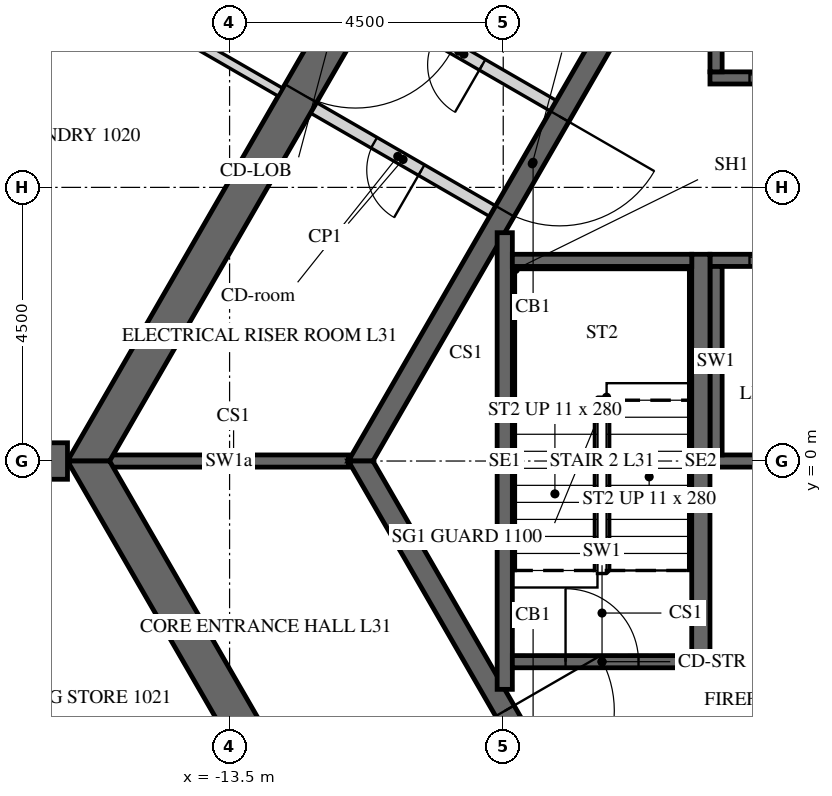
"""IFC4 building model, lengths in metres.
Left out: names, types, materials, properties, quantities, classifications, styles, units other than length and angle.
Written with IfcOpenShell. Run it as: python <this file> out.ifc"""

import sys

from ifc_helpers import new_model, si_unit, direction, frame, frame_2d, origin, place, context, subcontext, project, spatial, polyline, rectangle, outline, extrude, element, fill, save


model = new_model("IFC4")
c1 = context("Model", 3, precision=1e-05, world=origin(), true_north=direction((0.0, 1.0)))
c2 = subcontext(c1, "Body", "Model", "MODEL_VIEW")
j1 = project(units=[si_unit("LENGTHUNIT", "METRE"), si_unit("PLANEANGLEUNIT", "RADIAN")], contexts=[c1])
p1 = place(None, origin())
s1 = spatial("IfcSite", under=j1, at=p1, CompositionType="ELEMENT")
p2 = place(p1, origin())
s2 = spatial("IfcBuilding", under=s1, at=p2, CompositionType="ELEMENT")
p3 = place(p2, frame((0.0, 0.0, 135.0)))
s3 = spatial("IfcBuildingStorey", under=s2, at=p3, CompositionType="ELEMENT", Elevation=135.0)
p4 = place(p3, frame((-7.91, 13.7, -0.15), z_axis=(0.0, 0.0, 1.0), x_axis=(-0.499999880136, -0.866025472988, 0.0)))
e1 = element("IfcWall", 1, at=p4, inside=s3, PredefinedType="SHEAR", context=c2, shape_type="SweptSolid", body=[
    extrude(outline(polyline([(-0.173, -0.3), (15.993, -0.3), (15.646, 0.3), (0.173, 0.3), (-0.173, -0.3)])), origin(), (0.0, 0.0, 1.0), 3.9),
])
p5 = place(p4, frame((7.039, 0.0, 0.15)))
e2 = element("IfcOpeningElement", 2, at=p5, cuts=e1, PredefinedType="OPENING", context=c2, shape_type="SweptSolid", body=[
    extrude(rectangle(XDim=1.8, YDim=2.4, at=frame_2d((0.9, 1.2))), frame((0.0, 0.31, 0.0), z_axis=(0.0, -1.0, 0.0), x_axis=(1.0, 0.0, 0.0)), (0.0, 0.0, 1.0), 0.62),
])
p6 = place(p3, frame((-15.819, 0.0, -0.15), z_axis=(0.0, 0.0, 1.0), x_axis=(0.499999880136, -0.866025472988, 0.0)))
e3 = element("IfcWall", 3, at=p6, inside=s3, PredefinedType="SHEAR", context=c2, shape_type="SweptSolid", body=[
    extrude(outline(polyline([(-0.173, -0.3), (15.993, -0.3), (15.646, 0.3), (0.173, 0.3), (-0.173, -0.3)])), origin(), (0.0, 0.0, 1.0), 3.9),
])
p7 = place(p6, frame((6.981, 0.0, 0.15)))
e4 = element("IfcOpeningElement", 4, at=p7, cuts=e3, PredefinedType="OPENING", context=c2, shape_type="SweptSolid", body=[
    extrude(rectangle(XDim=1.8, YDim=2.4, at=frame_2d((0.9, 1.2))), frame((0.0, 0.31, 0.0), z_axis=(0.0, -1.0, 0.0), x_axis=(1.0, 0.0, 0.0)), (0.0, 0.0, 1.0), 0.62),
])
p8 = place(p3, frame((-16.166, 0.0, -0.15), z_axis=(0.0, 0.0, 1.0), x_axis=(-1.0, 0.0, 0.0)))
e5 = element("IfcWall", 5, at=p8, inside=s3, PredefinedType="SHEAR", context=c2, shape_type="SweptSolid", body=[
    extrude(rectangle(XDim=16.509, YDim=0.6, at=frame_2d((8.254, 0.0))), origin(), (0.0, 0.0, 1.0), 3.9),
])
p9 = place(p8, frame((7.354, 0.0, 0.15)))
e6 = element("IfcOpeningElement", 6, at=p9, cuts=e5, PredefinedType="OPENING", context=c2, shape_type="SweptSolid", body=[
    extrude(rectangle(XDim=1.8, YDim=2.4, at=frame_2d((0.9, 1.2))), frame((0.0, 0.31, 0.0), z_axis=(0.0, -1.0, 0.0), x_axis=(1.0, 0.0, 0.0)), (0.0, 0.0, 1.0), 0.62),
])
p10 = place(p3, frame((-5.673, 9.825, -0.15), z_axis=(0.0, 0.0, 1.0), x_axis=(-0.499995046907, -0.866028263435, 0.0)))
e7 = element("IfcWall", 7, at=p10, inside=s3, PredefinedType="SHEAR", context=c2, shape_type="SweptSolid", body=[
    extrude(outline(polyline([(-0.101, -0.175), (11.446, -0.175), (11.244, 0.175), (0.101, 0.175), (-0.101, -0.175)])), origin(), (0.0, 0.0, 1.0), 3.9),
])
p11 = place(p10, frame((4.801, 0.0, 0.15)))
e8 = element("IfcOpeningElement", 8, at=p11, cuts=e7, PredefinedType="OPENING", context=c2, shape_type="SweptSolid", body=[
    extrude(rectangle(XDim=1.8, YDim=2.4, at=frame_2d((0.9, 1.2))), frame((0.0, 0.185, 0.0), z_axis=(0.0, -1.0, 0.0), x_axis=(1.0, 0.0, 0.0)), (0.0, 0.0, 1.0), 0.37),
])
p12 = place(p3, frame((-11.345, 0.0, -0.15), z_axis=(0.0, 0.0, 1.0), x_axis=(0.499995046907, -0.866028263435, 0.0)))
e9 = element("IfcWall", 9, at=p12, inside=s3, PredefinedType="SHEAR", context=c2, shape_type="SweptSolid", body=[
    extrude(outline(polyline([(-0.101, -0.175), (11.446, -0.175), (11.244, 0.175), (0.101, 0.175), (-0.101, -0.175)])), origin(), (0.0, 0.0, 1.0), 3.9),
])
p13 = place(p12, frame((4.744, 0.0, 0.15)))
e10 = element("IfcOpeningElement", 10, at=p13, cuts=e9, PredefinedType="OPENING", context=c2, shape_type="SweptSolid", body=[
    extrude(rectangle(XDim=1.8, YDim=2.4, at=frame_2d((0.9, 1.2))), frame((0.0, 0.185, 0.0), z_axis=(0.0, -1.0, 0.0), x_axis=(1.0, 0.0, 0.0)), (0.0, 0.0, 1.0), 0.37),
])
p14 = place(p3, frame((-5.6, 6.3, -0.25), z_axis=(0.0, 0.0, 1.0), x_axis=(1.0, 0.0, 0.0)))
e11 = element("IfcWall", 11, at=p14, inside=s3, PredefinedType="SHEAR", context=c2, shape_type="SweptSolid", body=[
    extrude(rectangle(XDim=11.2, YDim=0.2, at=frame_2d((5.6, 0.0))), origin(), (0.0, 0.0, 1.0), 3.9),
])
p15 = place(p14, frame((0.65, 0.0, 0.25)))
e12 = element("IfcOpeningElement", 12, at=p15, cuts=e11, PredefinedType="OPENING", context=c2, shape_type="SweptSolid", body=[
    extrude(rectangle(XDim=1.1, YDim=2.1, at=frame_2d((0.55, 1.05))), frame((0.0, 0.11, 0.0), z_axis=(0.0, -1.0, 0.0), x_axis=(1.0, 0.0, 0.0)), (0.0, 0.0, 1.0), 0.22),
])
p16 = place(p14, frame((2.85, 0.0, 0.25)))
e13 = element("IfcOpeningElement", 13, at=p16, cuts=e11, PredefinedType="OPENING", context=c2, shape_type="SweptSolid", body=[
    extrude(rectangle(XDim=1.1, YDim=2.1, at=frame_2d((0.55, 1.05))), frame((0.0, 0.11, 0.0), z_axis=(0.0, -1.0, 0.0), x_axis=(1.0, 0.0, 0.0)), (0.0, 0.0, 1.0), 0.22),
])
p17 = place(p14, frame((5.05, 0.0, 0.25)))
e14 = element("IfcOpeningElement", 14, at=p17, cuts=e11, PredefinedType="OPENING", context=c2, shape_type="SweptSolid", body=[
    extrude(rectangle(XDim=1.1, YDim=2.1, at=frame_2d((0.55, 1.05))), frame((0.0, 0.11, 0.0), z_axis=(0.0, -1.0, 0.0), x_axis=(1.0, 0.0, 0.0)), (0.0, 0.0, 1.0), 0.22),
])
p18 = place(p14, frame((7.25, 0.0, 0.25)))
e15 = element("IfcOpeningElement", 15, at=p18, cuts=e11, PredefinedType="OPENING", context=c2, shape_type="SweptSolid", body=[
    extrude(rectangle(XDim=1.1, YDim=2.1, at=frame_2d((0.55, 1.05))), frame((0.0, 0.11, 0.0), z_axis=(0.0, -1.0, 0.0), x_axis=(1.0, 0.0, 0.0)), (0.0, 0.0, 1.0), 0.22),
])
p19 = place(p14, frame((9.45, 0.0, 0.25)))
e16 = element("IfcOpeningElement", 16, at=p19, cuts=e11, PredefinedType="OPENING", context=c2, shape_type="SweptSolid", body=[
    extrude(rectangle(XDim=1.1, YDim=2.1, at=frame_2d((0.55, 1.05))), frame((0.0, 0.11, 0.0), z_axis=(0.0, -1.0, 0.0), x_axis=(1.0, 0.0, 0.0)), (0.0, 0.0, 1.0), 0.22),
])
p20 = place(p3, frame((-5.5, 6.4, -0.25), z_axis=(0.0, 0.0, 1.0), x_axis=(0.0, 1.0, 0.0)))
e17 = element("IfcWall", 17, at=p20, inside=s3, PredefinedType="SHEAR", context=c2, shape_type="SweptSolid", body=[
    extrude(rectangle(XDim=2.9, YDim=0.2, at=frame_2d((1.45, 0.0))), origin(), (0.0, 0.0, 1.0), 3.9),
])
p21 = place(p3, frame((-5.6, 3.3, -0.25), z_axis=(0.0, 0.0, 1.0), x_axis=(1.0, 0.0, 0.0)))
e18 = element("IfcWall", 18, at=p21, inside=s3, PredefinedType="SHEAR", context=c2, shape_type="SweptSolid", body=[
    extrude(rectangle(XDim=11.2, YDim=0.2, at=frame_2d((5.6, 0.0))), origin(), (0.0, 0.0, 1.0), 3.9),
])
p22 = place(p21, frame((0.65, 0.0, 0.25)))
e19 = element("IfcOpeningElement", 19, at=p22, cuts=e18, PredefinedType="OPENING", context=c2, shape_type="SweptSolid", body=[
    extrude(rectangle(XDim=1.1, YDim=2.1, at=frame_2d((0.55, 1.05))), frame((0.0, 0.11, 0.0), z_axis=(0.0, -1.0, 0.0), x_axis=(1.0, 0.0, 0.0)), (0.0, 0.0, 1.0), 0.22),
])
p23 = place(p21, frame((2.85, 0.0, 0.25)))
e20 = element("IfcOpeningElement", 20, at=p23, cuts=e18, PredefinedType="OPENING", context=c2, shape_type="SweptSolid", body=[
    extrude(rectangle(XDim=1.1, YDim=2.1, at=frame_2d((0.55, 1.05))), frame((0.0, 0.11, 0.0), z_axis=(0.0, -1.0, 0.0), x_axis=(1.0, 0.0, 0.0)), (0.0, 0.0, 1.0), 0.22),
])
p24 = place(p21, frame((5.05, 0.0, 0.25)))
e21 = element("IfcOpeningElement", 21, at=p24, cuts=e18, PredefinedType="OPENING", context=c2, shape_type="SweptSolid", body=[
    extrude(rectangle(XDim=1.1, YDim=2.1, at=frame_2d((0.55, 1.05))), frame((0.0, 0.11, 0.0), z_axis=(0.0, -1.0, 0.0), x_axis=(1.0, 0.0, 0.0)), (0.0, 0.0, 1.0), 0.22),
])
p25 = place(p21, frame((7.25, 0.0, 0.25)))
e22 = element("IfcOpeningElement", 22, at=p25, cuts=e18, PredefinedType="OPENING", context=c2, shape_type="SweptSolid", body=[
    extrude(rectangle(XDim=1.1, YDim=2.1, at=frame_2d((0.55, 1.05))), frame((0.0, 0.11, 0.0), z_axis=(0.0, -1.0, 0.0), x_axis=(1.0, 0.0, 0.0)), (0.0, 0.0, 1.0), 0.22),
])
p26 = place(p21, frame((9.45, 0.0, 0.25)))
e23 = element("IfcOpeningElement", 23, at=p26, cuts=e18, PredefinedType="OPENING", context=c2, shape_type="SweptSolid", body=[
    extrude(rectangle(XDim=1.1, YDim=2.1, at=frame_2d((0.55, 1.05))), frame((0.0, 0.11, 0.0), z_axis=(0.0, -1.0, 0.0), x_axis=(1.0, 0.0, 0.0)), (0.0, 0.0, 1.0), 0.22),
])
p27 = place(p3, frame((-5.6, 0.0, -0.25), z_axis=(0.0, 0.0, 1.0), x_axis=(1.0, 0.0, 0.0)))
e24 = element("IfcWall", 24, at=p27, inside=s3, PredefinedType="SHEAR", context=c2, shape_type="SweptSolid", body=[
    extrude(rectangle(XDim=11.2, YDim=0.2, at=frame_2d((5.6, 0.0))), origin(), (0.0, 0.0, 1.0), 3.9),
])
p28 = place(p3, frame((-5.5, 0.1, -0.25), z_axis=(0.0, 0.0, 1.0), x_axis=(0.0, 1.0, 0.0)))
e25 = element("IfcWall", 25, at=p28, inside=s3, PredefinedType="SHEAR", context=c2, shape_type="SweptSolid", body=[
    extrude(rectangle(XDim=3.1, YDim=0.2, at=frame_2d((1.55, 0.0))), origin(), (0.0, 0.0, 1.0), 3.9),
])
p29 = place(p3, frame((-11.547, 0.0, -0.15), z_axis=(0.0, 0.0, 1.0), x_axis=(-1.0, 0.0, 0.0)))
e26 = element("IfcWall", 26, at=p29, inside=s3, PredefinedType="SHEAR", context=c2, shape_type="SweptSolid", body=[
    extrude(rectangle(XDim=3.926, YDim=0.2, at=frame_2d((1.963, 0.0))), origin(), (0.0, 0.0, 1.0), 3.9),
])
p30 = place(p3, frame((-9.175, 4.109, 0.0), z_axis=(0.0, 0.0, 1.0), x_axis=(-0.865989465428, 0.500062241894, 0.0)))
e27 = element("IfcWall", 27, at=p30, inside=s3, PredefinedType="PARTITIONING", context=c2, shape_type="SweptSolid", body=[
    extrude(rectangle(XDim=3.4, YDim=0.2, at=frame_2d((1.7, 0.0))), origin(), (0.0, 0.0, 1.0), 3.65),
])
p31 = place(p30, frame((1.351, 0.0, 0.0)))
e28 = element("IfcOpeningElement", 28, at=p31, cuts=e27, PredefinedType="OPENING", context=c2, shape_type="SweptSolid", body=[
    extrude(rectangle(XDim=0.9, YDim=2.1, at=frame_2d((0.45, 1.05))), frame((0.0, 0.11, 0.0), z_axis=(0.0, -1.0, 0.0), x_axis=(1.0, 0.0, 0.0)), (0.0, 0.0, 1.0), 0.22),
])
p32 = place(p3, frame((-8.175, 5.841, 0.0), z_axis=(0.0, 0.0, 1.0), x_axis=(-0.866020560687, 0.500008388397, 0.0)))
e29 = element("IfcWall", 29, at=p32, inside=s3, PredefinedType="PARTITIONING", context=c2, shape_type="SweptSolid", body=[
    extrude(rectangle(XDim=3.4, YDim=0.2, at=frame_2d((1.7, 0.0))), origin(), (0.0, 0.0, 1.0), 3.65),
])
p33 = place(p32, frame((1.35, 0.0, 0.0)))
e30 = element("IfcOpeningElement", 30, at=p33, cuts=e29, PredefinedType="OPENING", context=c2, shape_type="SweptSolid", body=[
    extrude(rectangle(XDim=0.9, YDim=2.1, at=frame_2d((0.45, 1.05))), frame((0.0, 0.11, 0.0), z_axis=(0.0, -1.0, 0.0), x_axis=(1.0, 0.0, 0.0)), (0.0, 0.0, 1.0), 0.22),
])
p34 = place(p3, frame((-5.75, -3.4, -0.25), z_axis=(0.0, 0.0, 1.0), x_axis=(0.0, 1.0, 0.0)))
e31 = element("IfcWall", 31, at=p34, inside=s3, PredefinedType="SHEAR", context=c2, shape_type="SweptSolid", body=[
    extrude(rectangle(XDim=6.8, YDim=0.3, at=frame_2d((3.4, 0.0))), origin(), (0.0, 0.0, 1.0), 3.9),
])
p35 = place(p3, frame((-8.975, -3.755, -0.25), z_axis=(0.0, 0.0, 1.0), x_axis=(0.0, 1.0, 0.0)))
e32 = element("IfcWall", 32, at=p35, inside=s3, PredefinedType="SHEAR", context=c2, shape_type="SweptSolid", body=[
    extrude(rectangle(XDim=7.51, YDim=0.25, at=frame_2d((3.755, 0.0))), origin(), (0.0, 0.0, 1.0), 3.9),
])
p36 = place(p3, frame((-8.85, 3.3, -0.25), z_axis=(0.0, 0.0, 1.0), x_axis=(1.0, 0.0, 0.0)))
e33 = element("IfcWall", 33, at=p36, inside=s3, PredefinedType="SHEAR", context=c2, shape_type="SweptSolid", body=[
    extrude(rectangle(XDim=2.95, YDim=0.2, at=frame_2d((1.475, 0.0))), origin(), (0.0, 0.0, 1.0), 3.9),
])
p37 = place(p3, frame((-8.85, -3.3, -0.25), z_axis=(0.0, 0.0, 1.0), x_axis=(1.0, 0.0, 0.0)))
e34 = element("IfcWall", 34, at=p37, inside=s3, PredefinedType="SHEAR", context=c2, shape_type="SweptSolid", body=[
    extrude(rectangle(XDim=2.95, YDim=0.2, at=frame_2d((1.475, 0.0))), origin(), (0.0, 0.0, 1.0), 3.9),
])
p38 = place(p37, frame((0.875, 0.0, 0.25)))
e35 = element("IfcOpeningElement", 35, at=p38, cuts=e34, PredefinedType="OPENING", context=c2, shape_type="SweptSolid", body=[
    extrude(rectangle(XDim=1.2, YDim=2.4, at=frame_2d((0.6, 1.2))), frame((0.0, 0.11, 0.0), z_axis=(0.0, -1.0, 0.0), x_axis=(1.0, 0.0, 0.0)), (0.0, 0.0, 1.0), 0.22),
])
p39 = place(p3, frame((-13.565, 21.575, 0.0), z_axis=(0.0, 0.0, 1.0), x_axis=(-0.438378393111, -0.898790511996, 0.0)))
e36 = element("IfcWall", 36, at=p39, inside=s3, PredefinedType="PARTITIONING", context=c2, shape_type="SweptSolid", body=[
    extrude(rectangle(XDim=21.584, YDim=0.15, at=frame_2d((10.792, 0.0))), origin(), (0.0, 0.0, 1.0), 2.838),
])
p40 = place(p39, frame((0.775, 0.0, 0.0)))
e37 = element("IfcOpeningElement", 37, at=p40, cuts=e36, PredefinedType="OPENING", context=c2, shape_type="SweptSolid", body=[
    extrude(rectangle(XDim=1.0, YDim=2.1, at=frame_2d((0.5, 1.05))), frame((0.0, 0.085, 0.0), z_axis=(0.0, -1.0, 0.0), x_axis=(1.0, 0.0, 0.0)), (0.0, 0.0, 1.0), 0.17),
])
p41 = place(p39, frame((11.134, 0.0, 0.0)))
e38 = element("IfcOpeningElement", 38, at=p41, cuts=e36, PredefinedType="OPENING", context=c2, shape_type="SweptSolid", body=[
    extrude(rectangle(XDim=1.0, YDim=2.1, at=frame_2d((0.5, 1.05))), frame((0.0, 0.085, 0.0), z_axis=(0.0, -1.0, 0.0), x_axis=(1.0, 0.0, 0.0)), (0.0, 0.0, 1.0), 0.17),
])
p42 = place(p39, frame((16.801, 0.0, 0.0)))
e39 = element("IfcOpeningElement", 39, at=p42, cuts=e36, PredefinedType="OPENING", context=c2, shape_type="SweptSolid", body=[
    extrude(rectangle(XDim=1.0, YDim=2.1, at=frame_2d((0.5, 1.05))), frame((0.0, 0.085, 0.0), z_axis=(0.0, -1.0, 0.0), x_axis=(1.0, 0.0, 0.0)), (0.0, 0.0, 1.0), 0.17),
])
p43 = place(p3, frame((-17.642, 8.94, 0.0), z_axis=(0.0, 0.0, 1.0), x_axis=(0.866017948234, -0.500012913169, 0.0)))
e40 = element("IfcWall", 40, at=p43, inside=s3, PredefinedType="PARTITIONING", context=c2, shape_type="SweptSolid", body=[
    extrude(rectangle(XDim=5.748, YDim=0.15, at=frame_2d((2.874, 0.0))), origin(), (0.0, 0.0, 1.0), 2.838),
])
p44 = place(p3, frame((-23.743, -2.175, 0.0), z_axis=(0.0, 0.0, 1.0), x_axis=(0.499992353047, -0.86602981871, 0.0)))
e41 = element("IfcWall", 41, at=p44, inside=s3, PredefinedType="PARTITIONING", context=c2, shape_type="SweptSolid", body=[
    extrude(rectangle(XDim=23.516, YDim=0.15, at=frame_2d((11.758, 0.0))), origin(), (0.0, 0.0, 1.0), 2.838),
])
p45 = place(p44, frame((10.099, 0.0, 0.0)))
e42 = element("IfcOpeningElement", 42, at=p45, cuts=e41, PredefinedType="OPENING", context=c2, shape_type="SweptSolid", body=[
    extrude(rectangle(XDim=1.0, YDim=2.1, at=frame_2d((0.5, 1.05))), frame((0.0, 0.085, 0.0), z_axis=(0.0, -1.0, 0.0), x_axis=(1.0, 0.0, 0.0)), (0.0, 0.0, 1.0), 0.17),
])
p46 = place(p44, frame((17.358, 0.0, 0.0)))
e43 = element("IfcOpeningElement", 43, at=p46, cuts=e41, PredefinedType="OPENING", context=c2, shape_type="SweptSolid", body=[
    extrude(rectangle(XDim=1.0, YDim=2.1, at=frame_2d((0.5, 1.05))), frame((0.0, 0.085, 0.0), z_axis=(0.0, -1.0, 0.0), x_axis=(1.0, 0.0, 0.0)), (0.0, 0.0, 1.0), 0.17),
])
p47 = place(p5, origin())
e44 = element("IfcDoor", 44, at=p47, inside=s3, OperationType="DOUBLE_DOOR_SINGLE_SWING", PredefinedType="DOOR", context=c2, shape_type="SweptSolid", body=[
    extrude(rectangle(XDim=1.8, YDim=2.4, at=frame_2d((0.9, 1.2))), frame((0.0, 0.025, 0.0), z_axis=(0.0, -1.0, 0.0), x_axis=(1.0, 0.0, 0.0)), (0.0, 0.0, 1.0), 0.05),
])
fill(e2, e44)
p48 = place(p11, origin())
e45 = element("IfcDoor", 45, at=p48, inside=s3, OperationType="DOUBLE_DOOR_SINGLE_SWING", PredefinedType="DOOR", context=c2, shape_type="SweptSolid", body=[
    extrude(rectangle(XDim=1.8, YDim=2.4, at=frame_2d((0.9, 1.2))), frame((0.0, 0.025, 0.0), z_axis=(0.0, -1.0, 0.0), x_axis=(1.0, 0.0, 0.0)), (0.0, 0.0, 1.0), 0.05),
])
fill(e8, e45)
p49 = place(p13, origin())
e46 = element("IfcDoor", 46, at=p49, inside=s3, OperationType="DOUBLE_DOOR_SINGLE_SWING", PredefinedType="DOOR", context=c2, shape_type="SweptSolid", body=[
    extrude(rectangle(XDim=1.8, YDim=2.4, at=frame_2d((0.9, 1.2))), frame((0.0, 0.025, 0.0), z_axis=(0.0, -1.0, 0.0), x_axis=(1.0, 0.0, 0.0)), (0.0, 0.0, 1.0), 0.05),
])
fill(e10, e46)
p50 = place(p31, origin())
e47 = element("IfcDoor", 47, at=p50, inside=s3, OperationType="SINGLE_SWING_LEFT", PredefinedType="DOOR", context=c2, shape_type="SweptSolid", body=[
    extrude(rectangle(XDim=0.9, YDim=2.1, at=frame_2d((0.45, 1.05))), frame((0.0, 0.025, 0.0), z_axis=(0.0, -1.0, 0.0), x_axis=(1.0, 0.0, 0.0)), (0.0, 0.0, 1.0), 0.05),
])
fill(e28, e47)
p51 = place(p33, origin())
e48 = element("IfcDoor", 48, at=p51, inside=s3, OperationType="SINGLE_SWING_LEFT", PredefinedType="DOOR", context=c2, shape_type="SweptSolid", body=[
    extrude(rectangle(XDim=0.9, YDim=2.1, at=frame_2d((0.45, 1.05))), frame((0.0, 0.025, 0.0), z_axis=(0.0, -1.0, 0.0), x_axis=(1.0, 0.0, 0.0)), (0.0, 0.0, 1.0), 0.05),
])
fill(e30, e48)
p52 = place(p38, origin())
e49 = element("IfcDoor", 49, at=p52, inside=s3, OperationType="SINGLE_SWING_LEFT", PredefinedType="DOOR", context=c2, shape_type="SweptSolid", body=[
    extrude(rectangle(XDim=1.2, YDim=2.4, at=frame_2d((0.6, 1.2))), frame((0.0, 0.025, 0.0), z_axis=(0.0, -1.0, 0.0), x_axis=(1.0, 0.0, 0.0)), (0.0, 0.0, 1.0), 0.05),
])
fill(e35, e49)
p53 = place(p15, origin())
e50 = element("IfcDoor", 50, at=p53, inside=s3, OperationType="SLIDING_TO_LEFT", PredefinedType="DOOR", context=c2, shape_type="SweptSolid", body=[
    extrude(rectangle(XDim=1.1, YDim=2.1, at=frame_2d((0.55, 1.05))), frame((0.0, 0.025, 0.0), z_axis=(0.0, -1.0, 0.0), x_axis=(1.0, 0.0, 0.0)), (0.0, 0.0, 1.0), 0.05),
])
fill(e12, e50)
p54 = place(p22, origin())
e51 = element("IfcDoor", 51, at=p54, inside=s3, OperationType="SLIDING_TO_LEFT", PredefinedType="DOOR", context=c2, shape_type="SweptSolid", body=[
    extrude(rectangle(XDim=1.1, YDim=2.1, at=frame_2d((0.55, 1.05))), frame((0.0, 0.025, 0.0), z_axis=(0.0, -1.0, 0.0), x_axis=(1.0, 0.0, 0.0)), (0.0, 0.0, 1.0), 0.05),
])
fill(e19, e51)
save(model, sys.argv[1])
